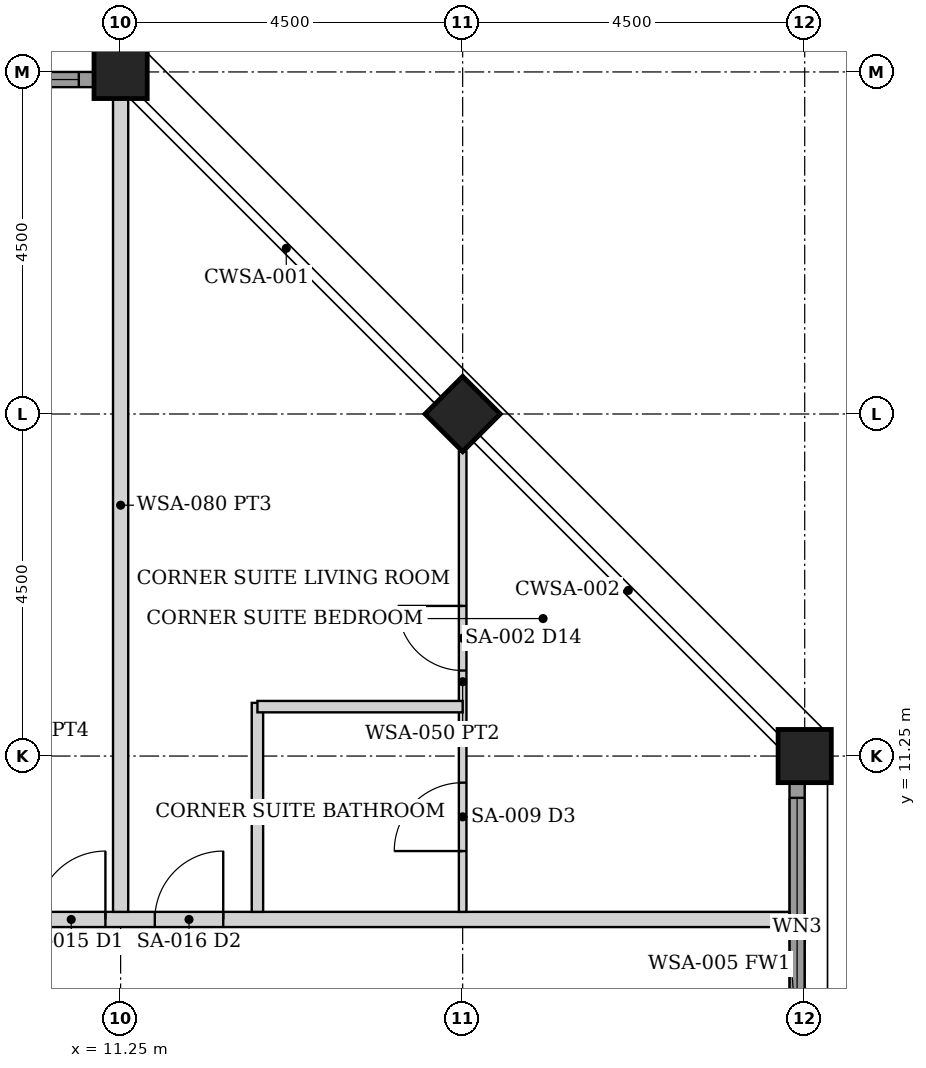
"""IFC4 building model, lengths in metres.
Left out: names, types, materials, properties, quantities, classifications, styles, units other than length and angle.
Written with IfcOpenShell. Run it as: python <this file> out.ifc"""

import sys

from ifc_helpers import new_model, si_unit, direction, frame, frame_2d, origin, origin_2d, place, context, subcontext, project, spatial, rectangle, hollow_rectangle, extrude, element, fill, save


model = new_model("IFC4")
c1 = context("Model", 3, precision=1e-05, world=origin(), true_north=direction((0.0, 1.0)))
c2 = subcontext(c1, "Body", "Model", "MODEL_VIEW")
j1 = project(units=[si_unit("LENGTHUNIT", "METRE"), si_unit("PLANEANGLEUNIT", "RADIAN")], contexts=[c1])
p1 = place(None, origin())
s1 = spatial("IfcSite", under=j1, at=p1, CompositionType="ELEMENT")
p2 = place(p1, origin())
s2 = spatial("IfcBuilding", under=s1, at=p2, CompositionType="ELEMENT")
p3 = place(p2, frame((0.0, 0.0, 200.8)))
s3 = spatial("IfcBuildingStorey", under=s2, at=p3, CompositionType="ELEMENT", Elevation=200.8)
for number, where, z_axis, x_axis in (
    (1, (11.25, 20.25, 0.0), (0.0, 0.0, 1.0), (0.0, 1.0, 0.0)),
    (2, (20.25, 11.25, 0.0), (0.0, 0.0, 1.0), (1.0, 0.0, 0.0)),
    (3, (15.75, 15.75, 0.0), (0.0, 0.0, 1.0), (0.707, 0.707, 0.0)),
):
    element("IfcColumn", number, at=place(p3, frame(where, z_axis=z_axis, x_axis=x_axis)), inside=s3, PredefinedType="COLUMN", context=c2, shape_type="SweptSolid", body=[
        extrude(hollow_rectangle(XDim=0.7, YDim=0.7, WallThickness=0.045, at=origin_2d()), origin(), (0.0, 0.0, 1.0), 3.75),
    ])
p4 = place(p3, frame((20.15, 7.105, 0.0), z_axis=(0.0, 0.0, 1.0), x_axis=(0.0, 1.0, 0.0)))
e4 = element("IfcWall", 4, at=p4, inside=s3, PredefinedType="SOLIDWALL", context=c2, shape_type="SweptSolid", body=[
    extrude(rectangle(XDim=3.79, YDim=0.2, at=frame_2d((1.895, 0.0))), origin(), (0.0, 0.0, 1.0), 2.629),
])
p5 = place(p4, frame((0.195, 0.0, 0.3)))
e5 = element("IfcOpeningElement", 5, at=p5, cuts=e4, PredefinedType="OPENING", context=c2, shape_type="SweptSolid", body=[
    extrude(rectangle(XDim=3.4, YDim=2.179, at=frame_2d((1.7, 1.089))), frame((0.0, 0.11, 0.0), z_axis=(0.0, -1.0, 0.0), x_axis=(1.0, 0.0, 0.0)), (0.0, 0.0, 1.0), 0.22),
])
p6 = place(p3, frame((7.105, 20.15, 0.0), z_axis=(0.0, 0.0, 1.0), x_axis=(1.0, 0.0, 0.0)))
e6 = element("IfcWall", 6, at=p6, inside=s3, PredefinedType="SOLIDWALL", context=c2, shape_type="SweptSolid", body=[
    extrude(rectangle(XDim=3.79, YDim=0.2, at=frame_2d((1.895, 0.0))), origin(), (0.0, 0.0, 1.0), 2.629),
])
p7 = place(p6, frame((0.195, 0.0, 0.3)))
e7 = element("IfcOpeningElement", 7, at=p7, cuts=e6, PredefinedType="OPENING", context=c2, shape_type="SweptSolid", body=[
    extrude(rectangle(XDim=3.4, YDim=2.179, at=frame_2d((1.7, 1.089))), frame((0.0, 0.11, 0.0), z_axis=(0.0, -1.0, 0.0), x_axis=(1.0, 0.0, 0.0)), (0.0, 0.0, 1.0), 0.22),
])
p8 = place(p3, frame((-20.05, 9.1, 0.0), z_axis=(0.0, 0.0, 1.0), x_axis=(1.0, 0.0, 0.0)))
e8 = element("IfcWall", 8, at=p8, inside=s3, PredefinedType="PARTITIONING", context=c2, shape_type="SweptSolid", body=[
    extrude(rectangle(XDim=40.1, YDim=0.2, at=frame_2d((20.05, 0.0))), origin(), (0.0, 0.0, 1.0), 2.629),
])
p9 = place(p8, frame((12.2, 0.0, 0.0)))
e9 = element("IfcOpeningElement", 9, at=p9, cuts=e8, PredefinedType="OPENING", context=c2, shape_type="SweptSolid", body=[
    extrude(rectangle(XDim=0.9, YDim=2.1, at=frame_2d((0.45, 1.05))), frame((0.0, 0.11, 0.0), z_axis=(0.0, -1.0, 0.0), x_axis=(1.0, 0.0, 0.0)), (0.0, 0.0, 1.0), 0.22),
])
p10 = place(p8, frame((16.7, 0.0, 0.0)))
e10 = element("IfcOpeningElement", 10, at=p10, cuts=e8, PredefinedType="OPENING", context=c2, shape_type="SweptSolid", body=[
    extrude(rectangle(XDim=0.9, YDim=2.1, at=frame_2d((0.45, 1.05))), frame((0.0, 0.11, 0.0), z_axis=(0.0, -1.0, 0.0), x_axis=(1.0, 0.0, 0.0)), (0.0, 0.0, 1.0), 0.22),
])
p11 = place(p8, frame((21.2, 0.0, 0.0)))
e11 = element("IfcOpeningElement", 11, at=p11, cuts=e8, PredefinedType="OPENING", context=c2, shape_type="SweptSolid", body=[
    extrude(rectangle(XDim=0.9, YDim=2.1, at=frame_2d((0.45, 1.05))), frame((0.0, 0.11, 0.0), z_axis=(0.0, -1.0, 0.0), x_axis=(1.0, 0.0, 0.0)), (0.0, 0.0, 1.0), 0.22),
])
p12 = place(p8, frame((25.7, 0.0, 0.0)))
e12 = element("IfcOpeningElement", 12, at=p12, cuts=e8, PredefinedType="OPENING", context=c2, shape_type="SweptSolid", body=[
    extrude(rectangle(XDim=0.9, YDim=2.1, at=frame_2d((0.45, 1.05))), frame((0.0, 0.11, 0.0), z_axis=(0.0, -1.0, 0.0), x_axis=(1.0, 0.0, 0.0)), (0.0, 0.0, 1.0), 0.22),
])
p13 = place(p8, frame((30.2, 0.0, 0.0)))
e13 = element("IfcOpeningElement", 13, at=p13, cuts=e8, PredefinedType="OPENING", context=c2, shape_type="SweptSolid", body=[
    extrude(rectangle(XDim=0.9, YDim=2.1, at=frame_2d((0.45, 1.05))), frame((0.0, 0.11, 0.0), z_axis=(0.0, -1.0, 0.0), x_axis=(1.0, 0.0, 0.0)), (0.0, 0.0, 1.0), 0.22),
])
p14 = place(p8, frame((31.75, 0.0, 0.0)))
e14 = element("IfcOpeningElement", 14, at=p14, cuts=e8, PredefinedType="OPENING", context=c2, shape_type="SweptSolid", body=[
    extrude(rectangle(XDim=0.9, YDim=2.1, at=frame_2d((0.45, 1.05))), frame((0.0, 0.11, 0.0), z_axis=(0.0, -1.0, 0.0), x_axis=(1.0, 0.0, 0.0)), (0.0, 0.0, 1.0), 0.22),
])
p15 = place(p8, frame((7.45, 0.0, 0.0)))
e15 = element("IfcOpeningElement", 15, at=p15, cuts=e8, PredefinedType="OPENING", context=c2, shape_type="SweptSolid", body=[
    extrude(rectangle(XDim=0.9, YDim=2.1, at=frame_2d((0.45, 1.05))), frame((0.0, 0.11, 0.0), z_axis=(0.0, -1.0, 0.0), x_axis=(1.0, 0.0, 0.0)), (0.0, 0.0, 1.0), 0.22),
])
p16 = place(p3, frame((11.25, 9.2, 0.0), z_axis=(0.0, 0.0, 1.0), x_axis=(0.0, 1.0, 0.0)))
e16 = element("IfcWall", 16, at=p16, inside=s3, PredefinedType="PARTITIONING", context=c2, shape_type="SweptSolid", body=[
    extrude(rectangle(XDim=10.7, YDim=0.2, at=frame_2d((5.35, 0.0))), origin(), (0.0, 0.0, 1.0), 2.629),
])
p17 = place(p3, frame((15.75, 9.2, 0.0), z_axis=(0.0, 0.0, 1.0), x_axis=(0.0, 1.0, 0.0)))
e17 = element("IfcWall", 17, at=p17, inside=s3, PredefinedType="PARTITIONING", context=c2, shape_type="SweptSolid", body=[
    extrude(rectangle(XDim=6.055, YDim=0.1, at=frame_2d((3.027, 0.0))), origin(), (0.0, 0.0, 1.0), 2.629),
])
p18 = place(p17, frame((3.175, 0.0, 0.0)))
e18 = element("IfcOpeningElement", 18, at=p18, cuts=e17, PredefinedType="OPENING", context=c2, shape_type="SweptSolid", body=[
    extrude(rectangle(XDim=0.85, YDim=2.1, at=frame_2d((0.425, 1.05))), frame((0.0, 0.06, 0.0), z_axis=(0.0, -1.0, 0.0), x_axis=(1.0, 0.0, 0.0)), (0.0, 0.0, 1.0), 0.12),
])
p19 = place(p17, frame((0.8, 0.0, 0.0)))
e19 = element("IfcOpeningElement", 19, at=p19, cuts=e17, PredefinedType="OPENING", context=c2, shape_type="SweptSolid", body=[
    extrude(rectangle(XDim=0.9, YDim=2.1, at=frame_2d((0.45, 1.05))), frame((0.0, 0.06, 0.0), z_axis=(0.0, -1.0, 0.0), x_axis=(1.0, 0.0, 0.0)), (0.0, 0.0, 1.0), 0.12),
])
p20 = place(p3, frame((13.05, 9.2, 0.0), z_axis=(0.0, 0.0, 1.0), x_axis=(0.0, 1.0, 0.0)))
e20 = element("IfcWall", 20, at=p20, inside=s3, PredefinedType="PARTITIONING", context=c2, shape_type="SweptSolid", body=[
    extrude(rectangle(XDim=2.75, YDim=0.15, at=frame_2d((1.375, 0.0))), origin(), (0.0, 0.0, 1.0), 2.629),
])
p21 = place(p3, frame((13.05, 11.9, 0.0), z_axis=(0.0, 0.0, 1.0), x_axis=(1.0, 0.0, 0.0)))
e21 = element("IfcWall", 21, at=p21, inside=s3, PredefinedType="PARTITIONING", context=c2, shape_type="SweptSolid", body=[
    extrude(rectangle(XDim=2.7, YDim=0.15, at=frame_2d((1.35, 0.0))), origin(), (0.0, 0.0, 1.0), 2.629),
])
p22 = place(p5, origin())
e22 = element("IfcWindow", 22, at=p22, inside=s3, PartitioningType="SINGLE_PANEL", PredefinedType="WINDOW", context=c2, shape_type="SweptSolid", body=[
    extrude(rectangle(XDim=3.4, YDim=2.179, at=frame_2d((1.7, 1.089))), frame((0.0, 0.03, 0.0), z_axis=(0.0, -1.0, 0.0), x_axis=(1.0, 0.0, 0.0)), (0.0, 0.0, 1.0), 0.06),
])
fill(e5, e22)
p23 = place(p7, origin())
e23 = element("IfcWindow", 23, at=p23, inside=s3, PartitioningType="SINGLE_PANEL", PredefinedType="WINDOW", context=c2, shape_type="SweptSolid", body=[
    extrude(rectangle(XDim=3.4, YDim=2.179, at=frame_2d((1.7, 1.089))), frame((0.0, 0.03, 0.0), z_axis=(0.0, -1.0, 0.0), x_axis=(1.0, 0.0, 0.0)), (0.0, 0.0, 1.0), 0.06),
])
fill(e7, e23)
p24 = place(p13, origin())
e24 = element("IfcDoor", 24, at=p24, inside=s3, OperationType="SINGLE_SWING_RIGHT", PredefinedType="DOOR", context=c2, shape_type="SweptSolid", body=[
    extrude(rectangle(XDim=0.9, YDim=2.1, at=frame_2d((0.45, 1.05))), frame((0.0, 0.025, 0.0), z_axis=(0.0, -1.0, 0.0), x_axis=(1.0, 0.0, 0.0)), (0.0, 0.0, 1.0), 0.05),
])
fill(e13, e24)
p25 = place(p14, origin())
e25 = element("IfcDoor", 25, at=p25, inside=s3, OperationType="SINGLE_SWING_RIGHT", PredefinedType="DOOR", context=c2, shape_type="SweptSolid", body=[
    extrude(rectangle(XDim=0.9, YDim=2.1, at=frame_2d((0.45, 1.05))), frame((0.0, 0.025, 0.0), z_axis=(0.0, -1.0, 0.0), x_axis=(1.0, 0.0, 0.0)), (0.0, 0.0, 1.0), 0.05),
])
fill(e14, e25)
p26 = place(p18, origin())
e26 = element("IfcDoor", 26, at=p26, inside=s3, OperationType="SINGLE_SWING_RIGHT", PredefinedType="DOOR", context=c2, shape_type="SweptSolid", body=[
    extrude(rectangle(XDim=0.85, YDim=2.1, at=frame_2d((0.425, 1.05))), frame((0.0, 0.025, 0.0), z_axis=(0.0, -1.0, 0.0), x_axis=(1.0, 0.0, 0.0)), (0.0, 0.0, 1.0), 0.05),
])
fill(e18, e26)
p27 = place(p19, origin())
e27 = element("IfcDoor", 27, at=p27, inside=s3, OperationType="SINGLE_SWING_LEFT", PredefinedType="DOOR", context=c2, shape_type="SweptSolid", body=[
    extrude(rectangle(XDim=0.9, YDim=2.1, at=frame_2d((0.45, 1.05))), frame((0.0, 0.025, 0.0), z_axis=(0.0, -1.0, 0.0), x_axis=(1.0, 0.0, 0.0)), (0.0, 0.0, 1.0), 0.05),
])
fill(e19, e27)
save(model, sys.argv[1])
